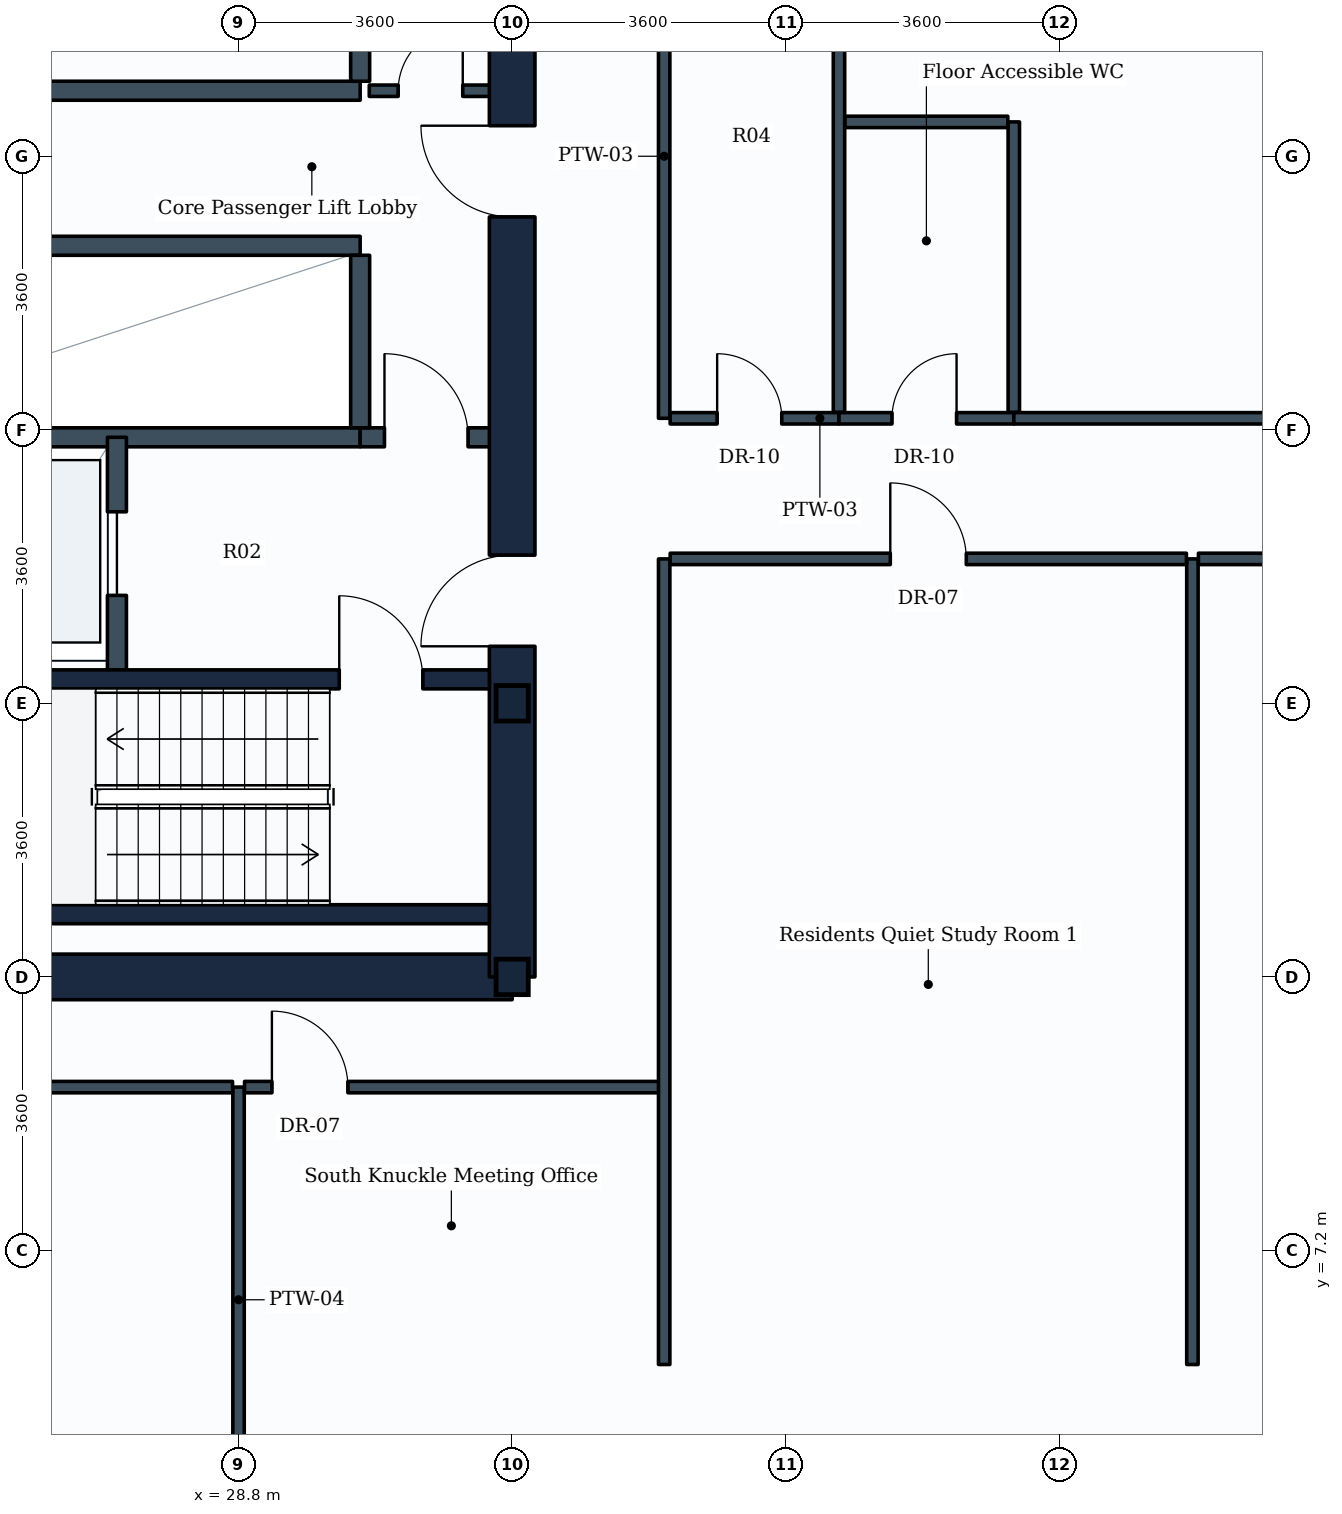
"""IFC4 building model, lengths in metres.
Left out: names, types, materials, properties, quantities, classifications, styles, units other than length and angle.
Written with IfcOpenShell. Run it as: python <this file> out.ifc"""

import sys

from ifc_helpers import new_model, si_unit, direction, frame, frame_2d, origin, origin_2d, place, context, subcontext, project, spatial, rectangle, i_section, extrude, element, fill, save


model = new_model("IFC4")
c1 = context("Model", 3, precision=1e-05, world=origin(), true_north=direction((0.0, 1.0)))
c2 = subcontext(c1, "Body", "Model", "MODEL_VIEW")
j1 = project(units=[si_unit("LENGTHUNIT", "METRE"), si_unit("PLANEANGLEUNIT", "RADIAN")], contexts=[c1])
p1 = place(None, origin())
s1 = spatial("IfcSite", under=j1, at=p1, CompositionType="ELEMENT")
p2 = place(p1, origin())
s2 = spatial("IfcBuilding", under=s1, at=p2, CompositionType="ELEMENT")
p3 = place(p2, frame((0.0, 0.0, 59.1)))
s3 = spatial("IfcBuildingStorey", under=s2, at=p3, CompositionType="ELEMENT", Elevation=59.1)
for number, where, z_axis, x_axis in (
    (1, (32.4, 10.8, 0.0), (0.0, 0.0, 1.0), (1.0, 0.0, 0.0)),
    (2, (32.4, 14.4, 0.0), (0.0, 0.0, 1.0), (1.0, 0.0, 0.0)),
):
    element("IfcColumn", number, at=place(p3, frame(where, z_axis=z_axis, x_axis=x_axis)), inside=s3, PredefinedType="COLUMN", context=c2, shape_type="SweptSolid", body=[
        extrude(i_section(OverallWidth=0.424, OverallDepth=0.467, WebThickness=0.033, FlangeThickness=0.053, FilletRadius=0.015, at=origin_2d()), origin(), (0.0, 0.0, 1.0), 3.9),
    ])
p4 = place(p3, frame((14.4, 10.8, 0.0), z_axis=(0.0, 0.0, 1.0), x_axis=(1.0, 0.0, 0.0)))
e3 = element("IfcWall", 3, at=p4, inside=s3, PredefinedType="SHEAR", context=c2, shape_type="SweptSolid", body=[
    extrude(rectangle(XDim=18.0, YDim=0.6, at=frame_2d((9.0, 0.0))), origin(), (0.0, 0.0, 1.0), 3.65),
])
p5 = place(p3, frame((32.4, 10.8, 0.0), z_axis=(0.0, 0.0, 1.0), x_axis=(0.0, 1.0, 0.0)))
e4 = element("IfcWall", 4, at=p5, inside=s3, PredefinedType="SHEAR", context=c2, shape_type="SweptSolid", body=[
    extrude(rectangle(XDim=14.4, YDim=0.6, at=frame_2d((7.2, 0.0))), origin(), (0.0, 0.0, 1.0), 3.65),
])
p6 = place(p5, frame((4.35, 0.0, 0.0)))
e5 = element("IfcOpeningElement", 5, at=p6, cuts=e4, PredefinedType="OPENING", context=c2, shape_type="SweptSolid", body=[
    extrude(rectangle(XDim=1.2, YDim=2.1, at=frame_2d((0.6, 1.05))), frame((0.0, 0.31, 0.0), z_axis=(0.0, -1.0, 0.0), x_axis=(1.0, 0.0, 0.0)), (0.0, 0.0, 1.0), 0.62),
])
p7 = place(p5, frame((10.0, 0.0, 0.0)))
e6 = element("IfcOpeningElement", 6, at=p7, cuts=e4, PredefinedType="OPENING", context=c2, shape_type="SweptSolid", body=[
    extrude(rectangle(XDim=1.2, YDim=2.1, at=frame_2d((0.6, 1.05))), frame((0.0, 0.31, 0.0), z_axis=(0.0, -1.0, 0.0), x_axis=(1.0, 0.0, 0.0)), (0.0, 0.0, 1.0), 0.62),
])
p8 = place(p3, frame((23.35, 11.625, 0.0), z_axis=(0.0, 0.0, 1.0), x_axis=(1.0, 0.0, 0.0)))
e7 = element("IfcWall", 7, at=p8, inside=s3, PredefinedType="SHEAR", context=c2, shape_type="SweptSolid", body=[
    extrude(rectangle(XDim=8.75, YDim=0.25, at=frame_2d((4.375, 0.0))), origin(), (0.0, 0.0, 1.0), 3.65),
])
p9 = place(p3, frame((23.35, 14.715, 0.0), z_axis=(0.0, 0.0, 1.0), x_axis=(1.0, 0.0, 0.0)))
e8 = element("IfcWall", 8, at=p9, inside=s3, PredefinedType="SHEAR", context=c2, shape_type="SweptSolid", body=[
    extrude(rectangle(XDim=8.75, YDim=0.25, at=frame_2d((4.375, 0.0))), origin(), (0.0, 0.0, 1.0), 3.65),
])
p10 = place(p9, frame((6.775, 0.0, 0.0)))
e9 = element("IfcOpeningElement", 9, at=p10, cuts=e8, PredefinedType="OPENING", context=c2, shape_type="SweptSolid", body=[
    extrude(rectangle(XDim=1.1, YDim=2.1, at=frame_2d((0.55, 1.05))), frame((0.0, 0.135, 0.0), z_axis=(0.0, -1.0, 0.0), x_axis=(1.0, 0.0, 0.0)), (0.0, 0.0, 1.0), 0.27),
])
p11 = place(p3, frame((21.88, 17.9, 0.0), z_axis=(0.0, 0.0, 1.0), x_axis=(1.0, 0.0, 0.0)))
e10 = element("IfcWall", 10, at=p11, inside=s3, PredefinedType="PARTITIONING", context=c2, shape_type="SweptSolid", body=[
    extrude(rectangle(XDim=8.52, YDim=0.25, at=frame_2d((4.26, 0.0))), origin(), (0.0, 0.0, 1.0), 3.635),
])
p12 = place(p3, frame((30.4, 17.9, 0.0), z_axis=(0.0, 0.0, 1.0), x_axis=(1.0, 0.0, 0.0)))
e11 = element("IfcWall", 11, at=p12, inside=s3, PredefinedType="PARTITIONING", context=c2, shape_type="SweptSolid", body=[
    extrude(rectangle(XDim=1.75, YDim=0.25, at=frame_2d((0.875, 0.0))), origin(), (0.0, 0.0, 1.0), 3.635),
])
p13 = place(p12, frame((0.32, 0.0, 0.0)))
e12 = element("IfcOpeningElement", 12, at=p13, cuts=e11, PredefinedType="OPENING", context=c2, shape_type="SweptSolid", body=[
    extrude(rectangle(XDim=1.1, YDim=2.1, at=frame_2d((0.55, 1.05))), frame((0.0, 0.135, 0.0), z_axis=(0.0, -1.0, 0.0), x_axis=(1.0, 0.0, 0.0)), (0.0, 0.0, 1.0), 0.27),
])
p14 = place(p3, frame((27.2, 14.84, 0.0), z_axis=(0.0, 0.0, 1.0), x_axis=(0.0, 1.0, 0.0)))
e13 = element("IfcWall", 13, at=p14, inside=s3, PredefinedType="PARTITIONING", context=c2, shape_type="SweptSolid", body=[
    extrude(rectangle(XDim=3.06, YDim=0.25, at=frame_2d((1.53, 0.0))), origin(), (0.0, 0.0, 1.0), 3.635),
])
p15 = place(p14, frame((0.98, 0.0, 0.0)))
e14 = element("IfcOpeningElement", 14, at=p15, cuts=e13, PredefinedType="OPENING", context=c2, shape_type="SweptSolid", body=[
    extrude(rectangle(XDim=1.1, YDim=2.1, at=frame_2d((0.55, 1.05))), frame((0.0, 0.135, 0.0), z_axis=(0.0, -1.0, 0.0), x_axis=(1.0, 0.0, 0.0)), (0.0, 0.0, 1.0), 0.27),
])
p16 = place(p3, frame((23.18, 20.42, 0.0), z_axis=(0.0, 0.0, 1.0), x_axis=(1.0, 0.0, 0.0)))
e15 = element("IfcWall", 15, at=p16, inside=s3, PredefinedType="PARTITIONING", context=c2, shape_type="SweptSolid", body=[
    extrude(rectangle(XDim=7.22, YDim=0.25, at=frame_2d((3.61, 0.0))), origin(), (0.0, 0.0, 1.0), 3.635),
])
p17 = place(p3, frame((30.4, 18.025, 0.0), z_axis=(0.0, 0.0, 1.0), x_axis=(0.0, 1.0, 0.0)))
e16 = element("IfcWall", 16, at=p17, inside=s3, PredefinedType="PARTITIONING", context=c2, shape_type="SweptSolid", body=[
    extrude(rectangle(XDim=2.27, YDim=0.25, at=frame_2d((1.135, 0.0))), origin(), (0.0, 0.0, 1.0), 3.635),
])
p18 = place(p3, frame((23.18, 22.46, 0.0), z_axis=(0.0, 0.0, 1.0), x_axis=(1.0, 0.0, 0.0)))
e17 = element("IfcWall", 17, at=p18, inside=s3, PredefinedType="PARTITIONING", context=c2, shape_type="SweptSolid", body=[
    extrude(rectangle(XDim=7.22, YDim=0.25, at=frame_2d((3.61, 0.0))), origin(), (0.0, 0.0, 1.0), 3.635),
])
p19 = place(p3, frame((30.4, 22.585, 0.0), z_axis=(0.0, 0.0, 1.0), x_axis=(0.0, 1.0, 0.0)))
e18 = element("IfcWall", 18, at=p19, inside=s3, PredefinedType="PARTITIONING", context=c2, shape_type="SweptSolid", body=[
    extrude(rectangle(XDim=2.315, YDim=0.25, at=frame_2d((1.157, 0.0))), origin(), (0.0, 0.0, 1.0), 3.635),
])
p20 = place(p3, frame((30.52, 22.46, 0.0), z_axis=(0.0, 0.0, 1.0), x_axis=(1.0, 0.0, 0.0)))
e19 = element("IfcWall", 19, at=p20, inside=s3, PredefinedType="PARTITIONING", context=c2, shape_type="SweptSolid", body=[
    extrude(rectangle(XDim=1.63, YDim=0.15, at=frame_2d((0.815, 0.0))), origin(), (0.0, 0.0, 1.0), 3.635),
])
p21 = place(p20, frame((0.38, 0.0, 0.0)))
e20 = element("IfcOpeningElement", 20, at=p21, cuts=e19, PredefinedType="OPENING", context=c2, shape_type="SweptSolid", body=[
    extrude(rectangle(XDim=0.85, YDim=2.1, at=frame_2d((0.425, 1.05))), frame((0.0, 0.085, 0.0), z_axis=(0.0, -1.0, 0.0), x_axis=(1.0, 0.0, 0.0)), (0.0, 0.0, 1.0), 0.17),
])
p22 = place(p3, frame((34.4, 18.15, 0.0), z_axis=(0.0, 0.0, 1.0), x_axis=(0.0, 1.0, 0.0)))
e21 = element("IfcWall", 21, at=p22, inside=s3, PredefinedType="PARTITIONING", context=c2, shape_type="SweptSolid", body=[
    extrude(rectangle(XDim=6.896, YDim=0.15, at=frame_2d((3.448, 0.0))), origin(), (0.0, 0.0, 1.0), 2.93),
])
p23 = place(p3, frame((34.479, 18.15, 0.0), z_axis=(0.0, 0.0, 1.0), x_axis=(1.0, 0.0, 0.0)))
e22 = element("IfcWall", 22, at=p23, inside=s3, PredefinedType="PARTITIONING", context=c2, shape_type="SweptSolid", body=[
    extrude(rectangle(XDim=2.221, YDim=0.15, at=frame_2d((1.11, 0.0))), origin(), (0.0, 0.0, 1.0), 3.08),
])
p24 = place(p23, frame((0.618, 0.0, 0.0)))
e23 = element("IfcOpeningElement", 23, at=p24, cuts=e22, PredefinedType="OPENING", context=c2, shape_type="SweptSolid", body=[
    extrude(rectangle(XDim=0.85, YDim=2.1, at=frame_2d((0.425, 1.05))), frame((0.0, 0.085, 0.0), z_axis=(0.0, -1.0, 0.0), x_axis=(1.0, 0.0, 0.0)), (0.0, 0.0, 1.0), 0.17),
])
p25 = place(p3, frame((36.7, 18.229, 0.0), z_axis=(0.0, 0.0, 1.0), x_axis=(0.0, 1.0, 0.0)))
e24 = element("IfcWall", 24, at=p25, inside=s3, PredefinedType="PARTITIONING", context=c2, shape_type="SweptSolid", body=[
    extrude(rectangle(XDim=6.817, YDim=0.15, at=frame_2d((3.408, 0.0))), origin(), (0.0, 0.0, 1.0), 2.93),
])
p26 = place(p3, frame((36.7, 18.15, 0.0), z_axis=(0.0, 0.0, 1.0), x_axis=(1.0, 0.0, 0.0)))
e25 = element("IfcWall", 25, at=p26, inside=s3, PredefinedType="PARTITIONING", context=c2, shape_type="SweptSolid", body=[
    extrude(rectangle(XDim=2.3, YDim=0.15, at=frame_2d((1.15, 0.0))), origin(), (0.0, 0.0, 1.0), 3.08),
])
p27 = place(p26, frame((0.697, 0.0, 0.0)))
e26 = element("IfcOpeningElement", 26, at=p27, cuts=e25, PredefinedType="OPENING", context=c2, shape_type="SweptSolid", body=[
    extrude(rectangle(XDim=0.85, YDim=2.1, at=frame_2d((0.425, 1.05))), frame((0.0, 0.085, 0.0), z_axis=(0.0, -1.0, 0.0), x_axis=(1.0, 0.0, 0.0)), (0.0, 0.0, 1.0), 0.17),
])
p28 = place(p3, frame((39.0, 18.229, 0.0), z_axis=(0.0, 0.0, 1.0), x_axis=(0.0, 1.0, 0.0)))
e27 = element("IfcWall", 27, at=p28, inside=s3, PredefinedType="PARTITIONING", context=c2, shape_type="SweptSolid", body=[
    extrude(rectangle(XDim=3.821, YDim=0.15, at=frame_2d((1.911, 0.0))), origin(), (0.0, 0.0, 1.0), 3.03),
])
p29 = place(p3, frame((36.779, 22.05, 0.0), z_axis=(0.0, 0.0, 1.0), x_axis=(1.0, 0.0, 0.0)))
e28 = element("IfcWall", 28, at=p29, inside=s3, PredefinedType="PARTITIONING", context=c2, shape_type="SweptSolid", body=[
    extrude(rectangle(XDim=2.142, YDim=0.15, at=frame_2d((1.071, 0.0))), origin(), (0.0, 0.0, 1.0), 3.635),
])
p30 = place(p3, frame((28.8, 9.35, 0.0), z_axis=(0.0, 0.0, 1.0), x_axis=(0.0, -1.0, 0.0)))
e29 = element("IfcWall", 29, at=p30, inside=s3, PredefinedType="PARTITIONING", context=c2, shape_type="SweptSolid", body=[
    extrude(rectangle(XDim=5.596, YDim=0.15, at=frame_2d((2.798, 0.0))), origin(), (0.0, 0.0, 1.0), 3.635),
])
p31 = place(p3, frame((13.08, 9.35, 0.0), z_axis=(0.0, 0.0, 1.0), x_axis=(1.0, 0.0, 0.0)))
e30 = element("IfcWall", 30, at=p31, inside=s3, PredefinedType="PARTITIONING", context=c2, shape_type="SweptSolid", body=[
    extrude(rectangle(XDim=15.641, YDim=0.15, at=frame_2d((7.82, 0.0))), origin(), (0.0, 0.0, 1.0), 3.04),
])
p32 = place(p3, frame((28.879, 9.35, 0.0), z_axis=(0.0, 0.0, 1.0), x_axis=(1.0, 0.0, 0.0)))
e31 = element("IfcWall", 31, at=p32, inside=s3, PredefinedType="PARTITIONING", context=c2, shape_type="SweptSolid", body=[
    extrude(rectangle(XDim=5.521, YDim=0.15, at=frame_2d((2.76, 0.0))), origin(), (0.0, 0.0, 1.0), 3.635),
])
p33 = place(p32, frame((0.36, 0.0, 0.0)))
e32 = element("IfcOpeningElement", 32, at=p33, cuts=e31, PredefinedType="OPENING", context=c2, shape_type="SweptSolid", body=[
    extrude(rectangle(XDim=1.0, YDim=2.1, at=frame_2d((0.5, 1.05))), frame((0.0, 0.085, 0.0), z_axis=(0.0, -1.0, 0.0), x_axis=(1.0, 0.0, 0.0)), (0.0, 0.0, 1.0), 0.17),
])
p34 = place(p3, frame((34.4, 5.7, 0.0), z_axis=(0.0, 0.0, 1.0), x_axis=(0.0, 1.0, 0.0)))
e33 = element("IfcWall", 33, at=p34, inside=s3, PredefinedType="PARTITIONING", context=c2, shape_type="SweptSolid", body=[
    extrude(rectangle(XDim=10.6, YDim=0.15, at=frame_2d((5.3, 0.0))), origin(), (0.0, 0.0, 1.0), 3.08),
])
p35 = place(p3, frame((41.35, 5.7, 0.0), z_axis=(0.0, 0.0, 1.0), x_axis=(0.0, 1.0, 0.0)))
e34 = element("IfcWall", 34, at=p35, inside=s3, PredefinedType="PARTITIONING", context=c2, shape_type="SweptSolid", body=[
    extrude(rectangle(XDim=10.6, YDim=0.15, at=frame_2d((5.3, 0.0))), origin(), (0.0, 0.0, 1.0), 3.03),
])
p36 = place(p3, frame((34.479, 16.3, 0.0), z_axis=(0.0, 0.0, 1.0), x_axis=(1.0, 0.0, 0.0)))
e35 = element("IfcWall", 35, at=p36, inside=s3, PredefinedType="PARTITIONING", context=c2, shape_type="SweptSolid", body=[
    extrude(rectangle(XDim=6.792, YDim=0.15, at=frame_2d((3.396, 0.0))), origin(), (0.0, 0.0, 1.0), 3.04),
])
p37 = place(p36, frame((2.896, 0.0, 0.0)))
e36 = element("IfcOpeningElement", 36, at=p37, cuts=e35, PredefinedType="OPENING", context=c2, shape_type="SweptSolid", body=[
    extrude(rectangle(XDim=1.0, YDim=2.1, at=frame_2d((0.5, 1.05))), frame((0.0, 0.085, 0.0), z_axis=(0.0, -1.0, 0.0), x_axis=(1.0, 0.0, 0.0)), (0.0, 0.0, 1.0), 0.17),
])
p38 = place(p3, frame((41.429, 16.3, 0.0), z_axis=(0.0, 0.0, 1.0), x_axis=(1.0, 0.0, 0.0)))
e37 = element("IfcWall", 37, at=p38, inside=s3, PredefinedType="PARTITIONING", context=c2, shape_type="SweptSolid", body=[
    extrude(rectangle(XDim=10.742, YDim=0.15, at=frame_2d((5.371, 0.0))), origin(), (0.0, 0.0, 1.0), 3.04),
])
p39 = place(p38, frame((4.831, 0.0, 0.0)))
e38 = element("IfcOpeningElement", 38, at=p39, cuts=e37, PredefinedType="OPENING", context=c2, shape_type="SweptSolid", body=[
    extrude(rectangle(XDim=1.0, YDim=2.1, at=frame_2d((0.5, 1.05))), frame((0.0, 0.085, 0.0), z_axis=(0.0, -1.0, 0.0), x_axis=(1.0, 0.0, 0.0)), (0.0, 0.0, 1.0), 0.17),
])
p40 = place(p3, frame((39.0, 18.15, 0.0), z_axis=(0.0, 0.0, 1.0), x_axis=(1.0, 0.0, 0.0)))
e39 = element("IfcWall", 39, at=p40, inside=s3, PredefinedType="PARTITIONING", context=c2, shape_type="SweptSolid", body=[
    extrude(rectangle(XDim=9.471, YDim=0.15, at=frame_2d((4.735, 0.0))), origin(), (0.0, 0.0, 1.0), 3.03),
])
p41 = place(p40, frame((4.275, 0.0, 0.0)))
e40 = element("IfcOpeningElement", 40, at=p41, cuts=e39, PredefinedType="OPENING", context=c2, shape_type="SweptSolid", body=[
    extrude(rectangle(XDim=1.0, YDim=2.1, at=frame_2d((0.5, 1.05))), frame((0.0, 0.085, 0.0), z_axis=(0.0, -1.0, 0.0), x_axis=(1.0, 0.0, 0.0)), (0.0, 0.0, 1.0), 0.17),
])
p42 = place(p10, origin())
e41 = element("IfcDoor", 41, at=p42, inside=s3, OperationType="SINGLE_SWING_LEFT", PredefinedType="DOOR", context=c2, shape_type="SweptSolid", body=[
    extrude(rectangle(XDim=1.1, YDim=2.1, at=frame_2d((0.55, 1.05))), frame((0.0, 0.025, 0.0), z_axis=(0.0, -1.0, 0.0), x_axis=(1.0, 0.0, 0.0)), (0.0, 0.0, 1.0), 0.05),
])
fill(e9, e41)
p43 = place(p15, origin())
e42 = element("IfcDoor", 42, at=p43, inside=s3, OperationType="SLIDING_TO_LEFT", PredefinedType="DOOR", context=c2, shape_type="SweptSolid", body=[
    extrude(rectangle(XDim=1.1, YDim=2.1, at=frame_2d((0.55, 1.05))), frame((0.0, 0.025, 0.0), z_axis=(0.0, -1.0, 0.0), x_axis=(1.0, 0.0, 0.0)), (0.0, 0.0, 1.0), 0.05),
])
fill(e14, e42)
p44 = place(p6, origin())
e43 = element("IfcDoor", 43, at=p44, inside=s3, OperationType="SINGLE_SWING_LEFT", PredefinedType="DOOR", context=c2, shape_type="SweptSolid", body=[
    extrude(rectangle(XDim=1.2, YDim=2.1, at=frame_2d((0.6, 1.05))), frame((0.0, 0.025, 0.0), z_axis=(0.0, -1.0, 0.0), x_axis=(1.0, 0.0, 0.0)), (0.0, 0.0, 1.0), 0.05),
])
fill(e5, e43)
p45 = place(p13, origin())
e44 = element("IfcDoor", 44, at=p45, inside=s3, OperationType="SINGLE_SWING_LEFT", PredefinedType="DOOR", context=c2, shape_type="SweptSolid", body=[
    extrude(rectangle(XDim=1.1, YDim=2.1, at=frame_2d((0.55, 1.05))), frame((0.0, 0.025, 0.0), z_axis=(0.0, -1.0, 0.0), x_axis=(1.0, 0.0, 0.0)), (0.0, 0.0, 1.0), 0.05),
])
fill(e12, e44)
p46 = place(p7, origin())
e45 = element("IfcDoor", 45, at=p46, inside=s3, OperationType="SINGLE_SWING_RIGHT", PredefinedType="DOOR", context=c2, shape_type="SweptSolid", body=[
    extrude(rectangle(XDim=1.2, YDim=2.1, at=frame_2d((0.6, 1.05))), frame((0.0, 0.025, 0.0), z_axis=(0.0, -1.0, 0.0), x_axis=(1.0, 0.0, 0.0)), (0.0, 0.0, 1.0), 0.05),
])
fill(e6, e45)
p47 = place(p21, origin())
e46 = element("IfcDoor", 46, at=p47, inside=s3, OperationType="SINGLE_SWING_RIGHT", PredefinedType="DOOR", context=c2, shape_type="SweptSolid", body=[
    extrude(rectangle(XDim=0.85, YDim=2.1, at=frame_2d((0.425, 1.05))), frame((0.0, 0.025, 0.0), z_axis=(0.0, -1.0, 0.0), x_axis=(1.0, 0.0, 0.0)), (0.0, 0.0, 1.0), 0.05),
])
fill(e20, e46)
p48 = place(p24, origin())
e47 = element("IfcDoor", 47, at=p48, inside=s3, OperationType="SINGLE_SWING_LEFT", PredefinedType="DOOR", context=c2, shape_type="SweptSolid", body=[
    extrude(rectangle(XDim=0.85, YDim=2.1, at=frame_2d((0.425, 1.05))), frame((0.0, 0.025, 0.0), z_axis=(0.0, -1.0, 0.0), x_axis=(1.0, 0.0, 0.0)), (0.0, 0.0, 1.0), 0.05),
])
fill(e23, e47)
p49 = place(p27, origin())
e48 = element("IfcDoor", 48, at=p49, inside=s3, OperationType="SINGLE_SWING_RIGHT", PredefinedType="DOOR", context=c2, shape_type="SweptSolid", body=[
    extrude(rectangle(XDim=0.85, YDim=2.1, at=frame_2d((0.425, 1.05))), frame((0.0, 0.025, 0.0), z_axis=(0.0, -1.0, 0.0), x_axis=(1.0, 0.0, 0.0)), (0.0, 0.0, 1.0), 0.05),
])
fill(e26, e48)
p50 = place(p33, origin())
e49 = element("IfcDoor", 49, at=p50, inside=s3, OperationType="SINGLE_SWING_LEFT", PredefinedType="DOOR", context=c2, shape_type="SweptSolid", body=[
    extrude(rectangle(XDim=1.0, YDim=2.1, at=frame_2d((0.5, 1.05))), frame((0.0, 0.025, 0.0), z_axis=(0.0, -1.0, 0.0), x_axis=(1.0, 0.0, 0.0)), (0.0, 0.0, 1.0), 0.05),
])
fill(e32, e49)
p51 = place(p37, origin())
e50 = element("IfcDoor", 50, at=p51, inside=s3, OperationType="SINGLE_SWING_LEFT", PredefinedType="DOOR", context=c2, shape_type="SweptSolid", body=[
    extrude(rectangle(XDim=1.0, YDim=2.1, at=frame_2d((0.5, 1.05))), frame((0.0, 0.025, 0.0), z_axis=(0.0, -1.0, 0.0), x_axis=(1.0, 0.0, 0.0)), (0.0, 0.0, 1.0), 0.05),
])
fill(e36, e50)
save(model, sys.argv[1])
